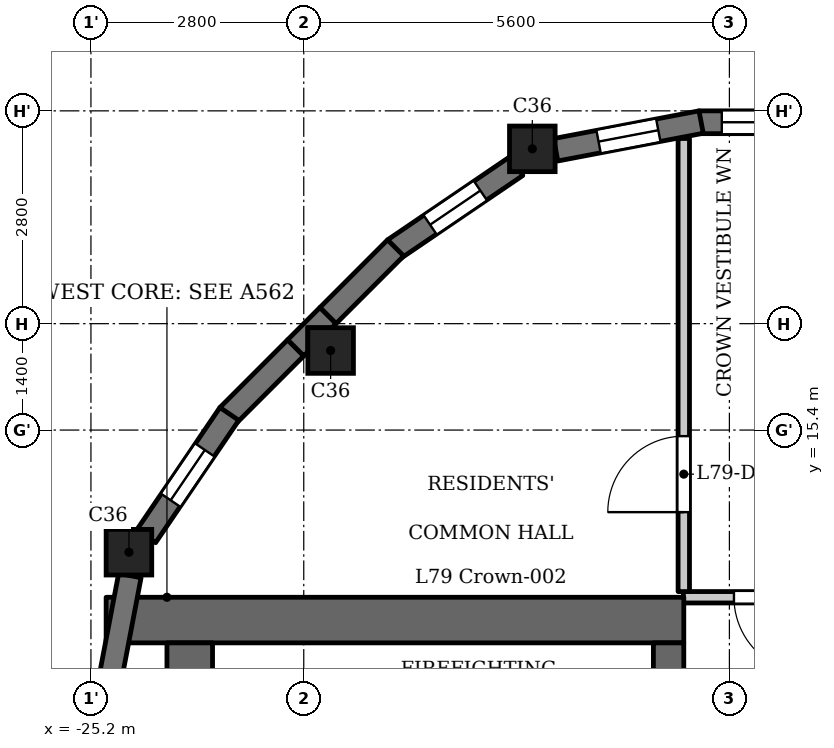
"""IFC4 building model, lengths in metres.
Left out: names, types, materials, properties, quantities, classifications, styles, units other than length and angle.
Written with IfcOpenShell. Run it as: python <this file> out.ifc"""

import sys

from ifc_helpers import new_model, si_unit, direction, frame, frame_2d, origin, origin_2d, place, context, subcontext, project, spatial, polyline, rectangle, outline, extrude, element, fill, save


model = new_model("IFC4")
c1 = context("Model", 3, precision=1e-05, world=origin(), true_north=direction((0.0, 1.0)))
c2 = subcontext(c1, "Body", "Model", "MODEL_VIEW")
j1 = project(units=[si_unit("LENGTHUNIT", "METRE"), si_unit("PLANEANGLEUNIT", "RADIAN")], contexts=[c1])
p1 = place(None, origin())
s1 = spatial("IfcSite", under=j1, at=p1, CompositionType="ELEMENT")
p2 = place(p1, origin())
s2 = spatial("IfcBuilding", under=s1, at=p2, CompositionType="ELEMENT")
p3 = place(p2, frame((0.0, 0.0, 306.9)))
s3 = spatial("IfcBuildingStorey", under=s2, at=p3, CompositionType="ELEMENT", Elevation=306.9)
for number, where, z_axis, x_axis in (
    (1, (-24.7, 13.793, 0.0), (0.0, 0.0, 1.0), (1.0, 0.0, 0.0)),
    (2, (-22.046, 16.446, 0.0), (0.0, 0.0, 1.0), (1.0, 0.0, 0.0)),
    (3, (-19.393, 19.1, 0.0), (0.0, 0.0, 1.0), (1.0, 0.0, 0.0)),
):
    element("IfcColumn", number, at=place(p3, frame(where, z_axis=z_axis, x_axis=x_axis)), inside=s3, PredefinedType="COLUMN", context=c2, shape_type="SweptSolid", body=[
        extrude(rectangle(XDim=0.6, YDim=0.6, at=origin_2d()), origin(), (0.0, 0.0, 1.0), 3.5),
    ])
p4 = place(p3, frame((-15.8, 19.45, 0.0), z_axis=(0.0, 0.0, 1.0), x_axis=(-1.0, 0.0, 0.0)))
e4 = element("IfcWall", 4, at=p4, inside=s3, PredefinedType="SOLIDWALL", context=c2, shape_type="SweptSolid", body=[
    extrude(rectangle(XDim=1.4, YDim=0.3, at=frame_2d((0.7, 0.0))), origin(), (0.0, 0.0, 1.0), 3.2),
])
p5 = place(p4, frame((0.3, 0.0, 0.6)))
e5 = element("IfcOpeningElement", 5, at=p5, cuts=e4, PredefinedType="OPENING", context=c2, shape_type="SweptSolid", body=[
    extrude(rectangle(XDim=0.8, YDim=1.55, at=frame_2d((0.4, 0.775))), frame((0.0, 0.16, 0.0), z_axis=(0.0, -1.0, 0.0), x_axis=(1.0, 0.0, 0.0)), (0.0, 0.0, 1.0), 0.32),
])
p6 = place(p3, frame((-17.172, 19.453, 0.0), z_axis=(0.0, 0.0, 1.0), x_axis=(-0.982286967073, -0.187382801553, 0.0)))
e6 = element("IfcWall", 6, at=p6, inside=s3, PredefinedType="SOLIDWALL", context=c2, shape_type="SweptSolid", body=[
    extrude(rectangle(XDim=1.948, YDim=0.3, at=frame_2d((0.974, 0.0))), origin(), (0.0, 0.0, 1.0), 2.6),
])
p7 = place(p6, frame((0.574, 0.0, 0.6)))
e7 = element("IfcOpeningElement", 7, at=p7, cuts=e6, PredefinedType="OPENING", context=c2, shape_type="SweptSolid", body=[
    extrude(rectangle(XDim=0.8, YDim=1.55, at=frame_2d((0.4, 0.775))), frame((0.0, 0.16, 0.0), z_axis=(0.0, -1.0, 0.0), x_axis=(1.0, 0.0, 0.0)), (0.0, 0.0, 1.0), 0.32),
])
p8 = place(p3, frame((-19.602, 18.874, 0.0), z_axis=(0.0, 0.0, 1.0), x_axis=(-0.827022075481, -0.562169446579, 0.0)))
e8 = element("IfcWall", 8, at=p8, inside=s3, PredefinedType="SOLIDWALL", context=c2, shape_type="SweptSolid", body=[
    extrude(rectangle(XDim=1.948, YDim=0.3, at=frame_2d((0.974, 0.0))), origin(), (0.0, 0.0, 1.0), 2.6),
])
p9 = place(p8, frame((0.574, 0.0, 0.6)))
e9 = element("IfcOpeningElement", 9, at=p9, cuts=e8, PredefinedType="OPENING", context=c2, shape_type="SweptSolid", body=[
    extrude(rectangle(XDim=0.8, YDim=1.55, at=frame_2d((0.4, 0.775))), frame((0.0, 0.16, 0.0), z_axis=(0.0, -1.0, 0.0), x_axis=(1.0, 0.0, 0.0)), (0.0, 0.0, 1.0), 0.32),
])
for number, where, z_axis, x_axis in (
    (10, (-21.191, 17.797, 0.0), (0.0, 0.0, 1.0), (-0.707, -0.707, 0.0)),
    (11, (-22.506, 16.482, 0.0), (0.0, 0.0, 1.0), (-0.707, -0.707, 0.0)),
):
    element("IfcWall", number, at=place(p3, frame(where, z_axis=z_axis, x_axis=x_axis)), inside=s3, PredefinedType="SOLIDWALL", context=c2, shape_type="SweptSolid", body=[
        extrude(rectangle(XDim=1.26, YDim=0.3, at=frame_2d((0.63, 0.0))), origin(), (0.0, 0.0, 1.0), 3.2),
    ])
p10 = place(p3, frame((-23.379, 15.613, 0.0), z_axis=(0.0, 0.0, 1.0), x_axis=(-0.562025435703, -0.827119948752, 0.0)))
e12 = element("IfcWall", 12, at=p10, inside=s3, PredefinedType="SOLIDWALL", context=c2, shape_type="SweptSolid", body=[
    extrude(rectangle(XDim=1.948, YDim=0.3, at=frame_2d((0.974, 0.0))), origin(), (0.0, 0.0, 1.0), 2.6),
])
p11 = place(p10, frame((0.574, 0.0, 0.6)))
e13 = element("IfcOpeningElement", 13, at=p11, cuts=e12, PredefinedType="OPENING", context=c2, shape_type="SweptSolid", body=[
    extrude(rectangle(XDim=0.8, YDim=1.55, at=frame_2d((0.4, 0.775))), frame((0.0, 0.16, 0.0), z_axis=(0.0, -1.0, 0.0), x_axis=(1.0, 0.0, 0.0)), (0.0, 0.0, 1.0), 0.32),
])
p12 = place(p3, frame((-24.688, 13.485, 0.0), z_axis=(0.0, 0.0, 1.0), x_axis=(-0.187354129902, -0.982292436095, 0.0)))
e14 = element("IfcWall", 14, at=p12, inside=s3, PredefinedType="SOLIDWALL", context=c2, shape_type="SweptSolid", body=[
    extrude(rectangle(XDim=1.947, YDim=0.3, at=frame_2d((0.973, 0.0))), origin(), (0.0, 0.0, 1.0), 2.6),
])
p13 = place(p3, frame((-17.4, 12.9, 0.0), z_axis=(0.0, 0.0, 1.0), x_axis=(-1.0, 0.0, 0.0)))
e15 = element("IfcWall", 15, at=p13, inside=s3, PredefinedType="SHEAR", context=c2, shape_type="SweptSolid", body=[
    extrude(rectangle(XDim=7.6, YDim=0.6, at=frame_2d((3.8, 0.0))), origin(), (0.0, 0.0, 1.0), 3.2),
])
p14 = place(p3, frame((-17.6, -12.6, 0.0), z_axis=(0.0, 0.0, 1.0), x_axis=(0.0, 1.0, 0.0)))
e16 = element("IfcWall", 16, at=p14, inside=s3, PredefinedType="SHEAR", context=c2, shape_type="SweptSolid", body=[
    extrude(rectangle(XDim=25.2, YDim=0.4, at=frame_2d((12.6, 0.0))), origin(), (0.0, 0.0, 1.0), 3.2),
])
p15 = place(p14, frame((8.8, 0.0, 0.0)))
e17 = element("IfcOpeningElement", 17, at=p15, cuts=e16, PredefinedType="OPENING", context=c2, shape_type="SweptSolid", body=[
    extrude(rectangle(XDim=0.9, YDim=2.1, at=frame_2d((0.45, 1.05))), frame((0.0, 0.21, 0.0), z_axis=(0.0, -1.0, 0.0), x_axis=(1.0, 0.0, 0.0)), (0.0, 0.0, 1.0), 0.42),
])
p16 = place(p14, frame((17.05, 0.0, 0.0)))
e18 = element("IfcOpeningElement", 18, at=p16, cuts=e16, PredefinedType="OPENING", context=c2, shape_type="SweptSolid", body=[
    extrude(rectangle(XDim=0.9, YDim=2.1, at=frame_2d((0.45, 1.05))), frame((0.0, 0.21, 0.0), z_axis=(0.0, -1.0, 0.0), x_axis=(1.0, 0.0, 0.0)), (0.0, 0.0, 1.0), 0.42),
])
p17 = place(p14, frame((23.25, 0.0, 0.0)))
e19 = element("IfcOpeningElement", 19, at=p17, cuts=e16, PredefinedType="OPENING", context=c2, shape_type="SweptSolid", body=[
    extrude(rectangle(XDim=1.1, YDim=2.1, at=frame_2d((0.55, 1.05))), frame((0.0, 0.21, 0.0), z_axis=(0.0, -1.0, 0.0), x_axis=(1.0, 0.0, 0.0)), (0.0, 0.0, 1.0), 0.42),
])
p18 = place(p14, frame((0.85, 0.0, 0.0)))
e20 = element("IfcOpeningElement", 20, at=p18, cuts=e16, PredefinedType="OPENING", context=c2, shape_type="SweptSolid", body=[
    extrude(rectangle(XDim=1.1, YDim=2.1, at=frame_2d((0.55, 1.05))), frame((0.0, 0.21, 0.0), z_axis=(0.0, -1.0, 0.0), x_axis=(1.0, 0.0, 0.0)), (0.0, 0.0, 1.0), 0.42),
])
p19 = place(p14, frame((13.075, 0.0, 0.0)))
e21 = element("IfcOpeningElement", 21, at=p19, cuts=e16, PredefinedType="OPENING", context=c2, shape_type="SweptSolid", body=[
    extrude(rectangle(XDim=1.8, YDim=2.1, at=frame_2d((0.9, 1.05))), frame((0.0, 0.21, 0.0), z_axis=(0.0, -1.0, 0.0), x_axis=(1.0, 0.0, 0.0)), (0.0, 0.0, 1.0), 0.42),
])
p20 = place(p3, frame((-23.9, -12.6, 0.0), z_axis=(0.0, 0.0, 1.0), x_axis=(0.0, 1.0, 0.0)))
e22 = element("IfcWall", 22, at=p20, inside=s3, PredefinedType="SHEAR", context=c2, shape_type="SweptSolid", body=[
    extrude(rectangle(XDim=25.2, YDim=0.6, at=frame_2d((12.6, 0.0))), origin(), (0.0, 0.0, 1.0), 3.2),
])
p21 = place(p3, frame((-17.405, 13.2, 0.0), z_axis=(0.0, 0.0, 1.0), x_axis=(1.0, 0.0, 0.0)))
e23 = element("IfcWall", 23, at=p21, inside=s3, PredefinedType="PARTITIONING", context=c2, shape_type="SweptSolid", body=[
    extrude(rectangle(XDim=2.085, YDim=0.15, at=frame_2d((1.042, 0.0))), origin(), (0.0, 0.0, 1.0), 3.2),
])
p22 = place(p21, frame((0.665, 0.0, 0.0)))
e24 = element("IfcOpeningElement", 24, at=p22, cuts=e23, PredefinedType="OPENING", context=c2, shape_type="SweptSolid", body=[
    extrude(rectangle(XDim=1.0, YDim=2.1, at=frame_2d((0.5, 1.05))), frame((0.0, 0.085, 0.0), z_axis=(0.0, -1.0, 0.0), x_axis=(1.0, 0.0, 0.0)), (0.0, 0.0, 1.0), 0.17),
])
p23 = place(p3, frame((-17.4, 13.275, 0.0), z_axis=(0.0, 0.0, 1.0), x_axis=(0.0, 1.0, 0.0)))
e25 = element("IfcWall", 25, at=p23, inside=s3, PredefinedType="PARTITIONING", context=c2, shape_type="SweptSolid", body=[
    extrude(rectangle(XDim=5.961, YDim=0.15, at=frame_2d((2.981, 0.0))), origin(), (0.0, 0.0, 1.0), 3.2),
])
p24 = place(p23, frame((1.045, 0.0, 0.0)))
e26 = element("IfcOpeningElement", 26, at=p24, cuts=e25, PredefinedType="OPENING", context=c2, shape_type="SweptSolid", body=[
    extrude(rectangle(XDim=1.0, YDim=2.1, at=frame_2d((0.5, 1.05))), frame((0.0, 0.085, 0.0), z_axis=(0.0, -1.0, 0.0), x_axis=(1.0, 0.0, 0.0)), (0.0, 0.0, 1.0), 0.17),
])
p25 = place(p3, origin())
e27 = element("IfcWall", 27, at=p25, inside=s3, PredefinedType="SOLIDWALL", context=c2, shape_type="SweptSolid", body=[
    extrude(outline(polyline([(-21.976, 16.8), (-22.188, 17.012), (-22.612, 16.588), (-22.4, 16.376), (-22.346, 16.429), (-22.346, 16.746), (-22.029, 16.746), (-21.976, 16.8)])), origin(), (0.0, 0.0, 1.0), 3.2),
])
p26 = place(p22, origin())
e28 = element("IfcDoor", 28, at=p26, inside=s3, OperationType="SINGLE_SWING_RIGHT", PredefinedType="DOOR", context=c2, shape_type="SweptSolid", body=[
    extrude(rectangle(XDim=1.0, YDim=2.1, at=frame_2d((0.5, 1.05))), frame((0.0, 0.025, 0.0), z_axis=(0.0, -1.0, 0.0), x_axis=(1.0, 0.0, 0.0)), (0.0, 0.0, 1.0), 0.05),
])
fill(e24, e28)
p27 = place(p24, origin())
e29 = element("IfcDoor", 29, at=p27, inside=s3, OperationType="SINGLE_SWING_RIGHT", PredefinedType="DOOR", context=c2, shape_type="SweptSolid", body=[
    extrude(rectangle(XDim=1.0, YDim=2.1, at=frame_2d((0.5, 1.05))), frame((0.0, 0.025, 0.0), z_axis=(0.0, -1.0, 0.0), x_axis=(1.0, 0.0, 0.0)), (0.0, 0.0, 1.0), 0.05),
])
fill(e26, e29)
p28 = place(p5, origin())
e30 = element("IfcWindow", 30, at=p28, inside=s3, PartitioningType="SINGLE_PANEL", PredefinedType="WINDOW", context=c2, shape_type="SweptSolid", body=[
    extrude(rectangle(XDim=0.8, YDim=1.55, at=frame_2d((0.4, 0.775))), frame((0.0, 0.03, 0.0), z_axis=(0.0, -1.0, 0.0), x_axis=(1.0, 0.0, 0.0)), (0.0, 0.0, 1.0), 0.06),
])
fill(e5, e30)
p29 = place(p7, origin())
e31 = element("IfcWindow", 31, at=p29, inside=s3, PartitioningType="SINGLE_PANEL", PredefinedType="WINDOW", context=c2, shape_type="SweptSolid", body=[
    extrude(rectangle(XDim=0.8, YDim=1.55, at=frame_2d((0.4, 0.775))), frame((0.0, 0.03, 0.0), z_axis=(0.0, -1.0, 0.0), x_axis=(1.0, 0.0, 0.0)), (0.0, 0.0, 1.0), 0.06),
])
fill(e7, e31)
p30 = place(p9, origin())
e32 = element("IfcWindow", 32, at=p30, inside=s3, PartitioningType="SINGLE_PANEL", PredefinedType="WINDOW", context=c2, shape_type="SweptSolid", body=[
    extrude(rectangle(XDim=0.8, YDim=1.55, at=frame_2d((0.4, 0.775))), frame((0.0, 0.03, 0.0), z_axis=(0.0, -1.0, 0.0), x_axis=(1.0, 0.0, 0.0)), (0.0, 0.0, 1.0), 0.06),
])
fill(e9, e32)
p31 = place(p11, origin())
e33 = element("IfcWindow", 33, at=p31, inside=s3, PartitioningType="SINGLE_PANEL", PredefinedType="WINDOW", context=c2, shape_type="SweptSolid", body=[
    extrude(rectangle(XDim=0.8, YDim=1.55, at=frame_2d((0.4, 0.775))), frame((0.0, 0.03, 0.0), z_axis=(0.0, -1.0, 0.0), x_axis=(1.0, 0.0, 0.0)), (0.0, 0.0, 1.0), 0.06),
])
fill(e13, e33)
save(model, sys.argv[1])
